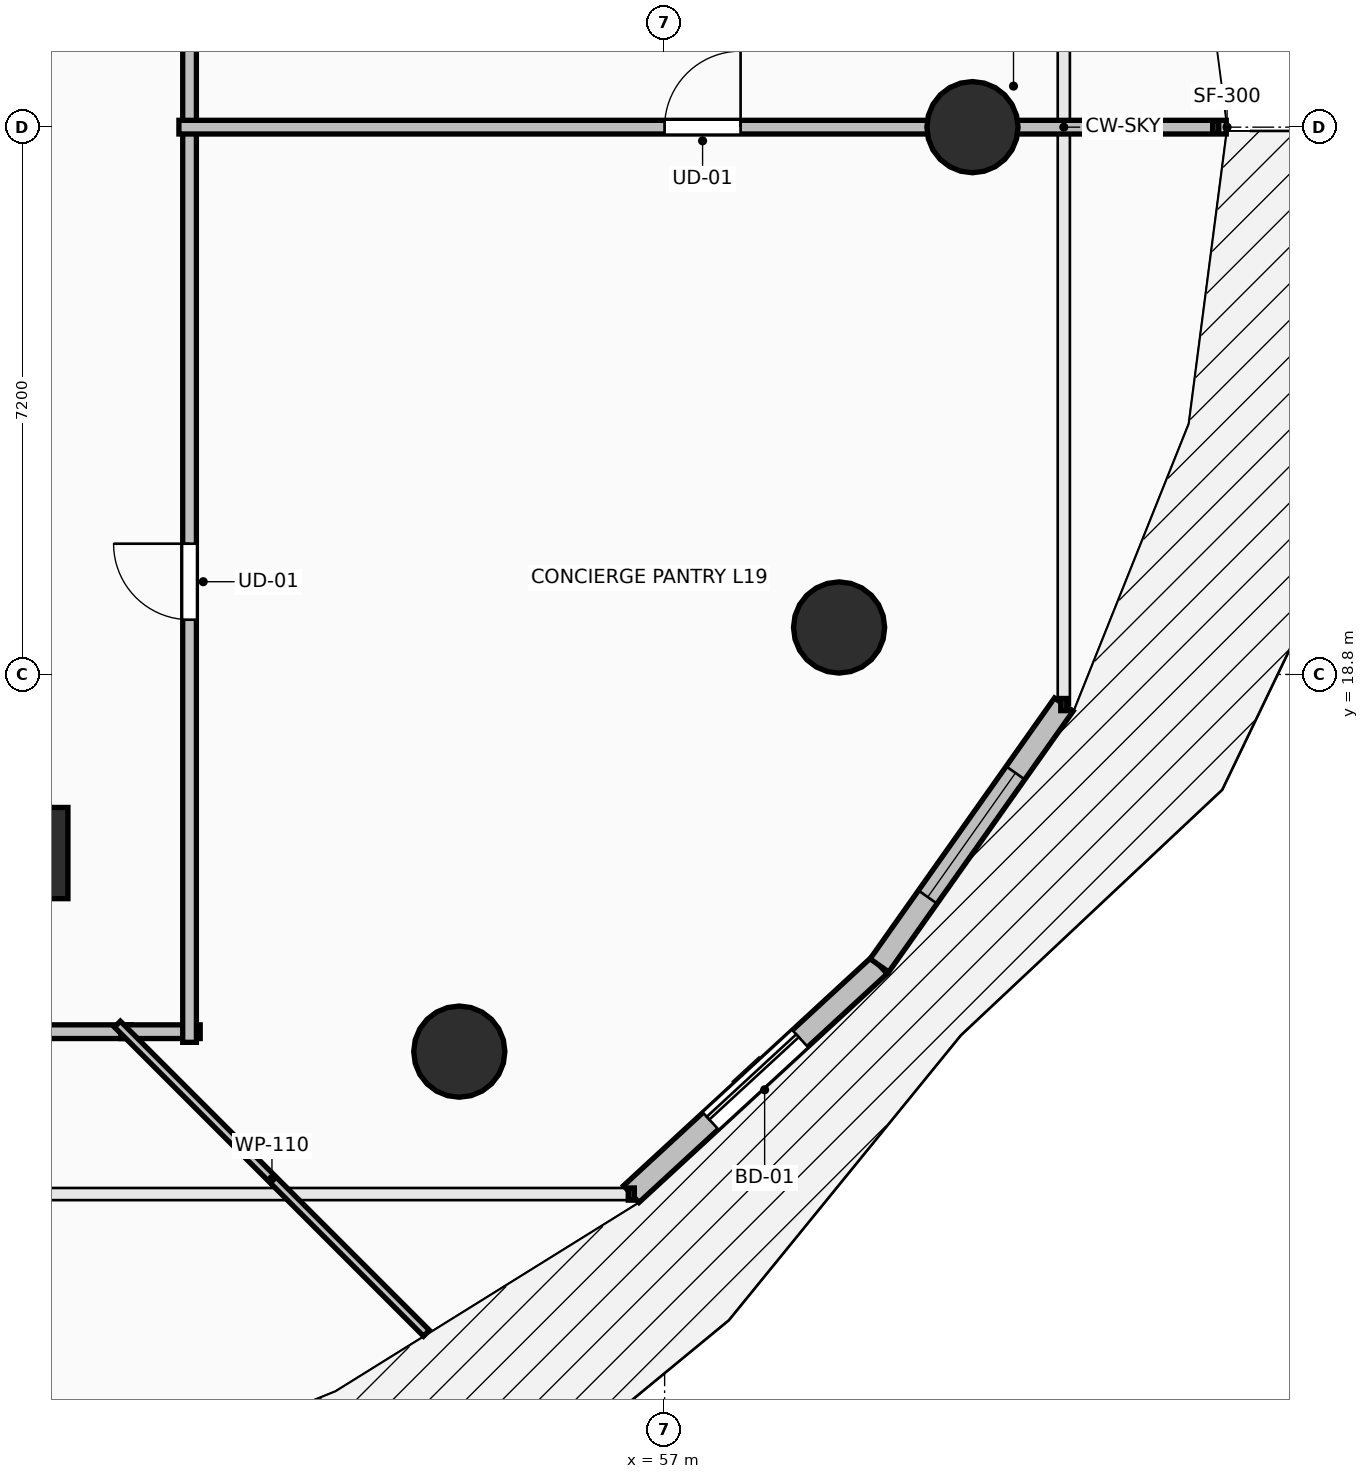
"""IFC4 building model, lengths in metres.
Left out: names, types, materials, properties, quantities, classifications, styles, units other than length and angle.
Written with IfcOpenShell. Run it as: python <this file> out.ifc"""

import sys

from ifc_helpers import new_model, si_unit, direction, frame, frame_2d, origin, origin_2d, place, context, subcontext, project, spatial, rectangle, circle, extrude, element, fill, save


model = new_model("IFC4")
c1 = context("Model", 3, precision=1e-05, world=origin(), true_north=direction((0.0, 1.0)))
c2 = subcontext(c1, "Body", "Model", "MODEL_VIEW")
j1 = project(units=[si_unit("LENGTHUNIT", "METRE"), si_unit("PLANEANGLEUNIT", "RADIAN")], contexts=[c1])
p1 = place(None, origin())
s1 = spatial("IfcSite", under=j1, at=p1, CompositionType="ELEMENT")
p2 = place(p1, origin())
s2 = spatial("IfcBuilding", under=s1, at=p2, CompositionType="ELEMENT")
p3 = place(p2, frame((0.0, 0.0, 74.3)))
s3 = spatial("IfcBuildingStorey", under=s2, at=p3, CompositionType="ELEMENT", Elevation=74.3)
for number, where, z_axis, x_axis in (
    (1, (61.05, 26.0, 0.0), (0.0, 0.0, 1.0), (1.0, 0.0, 0.0)),
    (2, (54.299, 13.838, 0.0), (0.0, 0.0, 1.0), (0.707, -0.707, 0.0)),
    (3, (59.295, 19.418, 0.0), (0.0, 0.0, 1.0), (0.924, -0.383, 0.0)),
):
    element("IfcColumn", number, at=place(p3, frame(where, z_axis=z_axis, x_axis=x_axis)), inside=s3, PredefinedType="COLUMN", context=c2, shape_type="SweptSolid", body=[
        extrude(circle(Radius=0.6, at=origin_2d()), origin(), (0.0, 0.0, 1.0), 4.5),
    ])
p4 = place(p3, frame((48.75, 16.45, 0.0), z_axis=(0.0, 0.0, 1.0), x_axis=(1.0, 0.0, 0.0)))
e4 = element("IfcColumn", 4, at=p4, inside=s3, PredefinedType="PILASTER", context=c2, shape_type="SweptSolid", body=[
    extrude(rectangle(XDim=0.8, YDim=1.2, at=origin_2d()), origin(), (0.0, 0.0, 1.0), 4.5),
])
p5 = place(p3, frame((56.562, 11.964, 0.0), z_axis=(0.0, 0.0, 1.0), x_axis=(0.735416718093, 0.677615119924, 0.0)))
e5 = element("IfcWall", 5, at=p5, inside=s3, PredefinedType="STANDARD", context=c2, shape_type="SweptSolid", body=[
    extrude(rectangle(XDim=4.439, YDim=0.3, at=frame_2d((2.22, 0.0))), origin(), (0.0, 0.0, 1.0), 4.24),
])
p6 = place(p5, frame((1.419, 0.0, 0.0)))
e6 = element("IfcOpeningElement", 6, at=p6, cuts=e5, PredefinedType="OPENING", context=c2, shape_type="SweptSolid", body=[
    extrude(rectangle(XDim=1.6, YDim=2.3, at=frame_2d((0.8, 1.15))), frame((0.0, 0.165, 0.0), z_axis=(0.0, -1.0, 0.0), x_axis=(1.0, 0.0, 0.0)), (0.0, 0.0, 1.0), 0.33),
])
p7 = place(p3, frame((59.826, 14.972, 0.0), z_axis=(0.0, 0.0, 1.0), x_axis=(0.57716435238, 0.81662801222, 0.0)))
e7 = element("IfcWall", 7, at=p7, inside=s3, PredefinedType="STANDARD", context=c2, shape_type="SweptSolid", body=[
    extrude(rectangle(XDim=4.202, YDim=0.3, at=frame_2d((2.101, 0.0))), origin(), (0.0, 0.0, 1.0), 4.24),
])
p8 = place(p7, frame((1.101, 0.0, 0.85)))
e8 = element("IfcOpeningElement", 8, at=p8, cuts=e7, PredefinedType="OPENING", context=c2, shape_type="SweptSolid", body=[
    extrude(rectangle(XDim=2.0, YDim=2.45, at=frame_2d((1.0, 1.225))), frame((0.0, 0.165, 0.0), z_axis=(0.0, -1.0, 0.0), x_axis=(1.0, 0.0, 0.0)), (0.0, 0.0, 1.0), 0.33),
])
p9 = place(p3, frame((50.75, 25.94, 0.0), z_axis=(0.0, 0.0, 1.0), x_axis=(0.0, 1.0, 0.0)))
e9 = element("IfcWall", 9, at=p9, inside=s3, PredefinedType="PARTITIONING", context=c2, shape_type="SweptSolid", body=[
    extrude(rectangle(XDim=10.01, YDim=0.18, at=frame_2d((5.005, 0.0))), origin(), (0.0, 0.0, 1.0), 3.432),
])
p10 = place(p9, frame((4.405, 0.0, 0.0)))
e10 = element("IfcOpeningElement", 10, at=p10, cuts=e9, PredefinedType="OPENING", context=c2, shape_type="SweptSolid", body=[
    extrude(rectangle(XDim=1.2, YDim=2.15, at=frame_2d((0.6, 1.075))), frame((0.0, 0.105, 0.0), z_axis=(0.0, -1.0, 0.0), x_axis=(1.0, 0.0, 0.0)), (0.0, 0.0, 1.0), 0.21),
])
p11 = place(p3, frame((42.34, 14.1, 0.0), z_axis=(0.0, 0.0, 1.0), x_axis=(1.0, 0.0, 0.0)))
e11 = element("IfcWall", 11, at=p11, inside=s3, PredefinedType="PARTITIONING", context=c2, shape_type="SweptSolid", body=[
    extrude(rectangle(XDim=7.645, YDim=0.18, at=frame_2d((3.823, 0.0))), origin(), (0.0, 0.0, 1.0), 3.432),
])
p12 = place(p11, frame((3.323, 0.0, 0.0)))
e12 = element("IfcOpeningElement", 12, at=p12, cuts=e11, PredefinedType="OPENING", context=c2, shape_type="SweptSolid", body=[
    extrude(rectangle(XDim=1.0, YDim=2.15, at=frame_2d((0.5, 1.075))), frame((0.0, 0.105, 0.0), z_axis=(0.0, -1.0, 0.0), x_axis=(1.0, 0.0, 0.0)), (0.0, 0.0, 1.0), 0.21),
])
p13 = place(p3, frame((49.845, 14.1, 0.0), z_axis=(0.0, 0.0, 1.0), x_axis=(1.0, 0.0, 0.0)))
e13 = element("IfcWall", 13, at=p13, inside=s3, PredefinedType="PARTITIONING", context=c2, shape_type="SweptSolid", body=[
    extrude(rectangle(XDim=1.045, YDim=0.18, at=frame_2d((0.522, 0.0))), origin(), (0.0, 0.0, 1.0), 3.874),
])
p14 = place(p3, frame((50.75, 13.96, 0.0), z_axis=(0.0, 0.0, 1.0), x_axis=(0.0, 1.0, 0.0)))
e14 = element("IfcWall", 14, at=p14, inside=s3, PredefinedType="PARTITIONING", context=c2, shape_type="SweptSolid", body=[
    extrude(rectangle(XDim=12.12, YDim=0.18, at=frame_2d((6.06, 0.0))), origin(), (0.0, 0.0, 1.0), 3.432),
])
p15 = place(p14, frame((5.56, 0.0, 0.0)))
e15 = element("IfcOpeningElement", 15, at=p15, cuts=e14, PredefinedType="OPENING", context=c2, shape_type="SweptSolid", body=[
    extrude(rectangle(XDim=1.0, YDim=2.15, at=frame_2d((0.5, 1.075))), frame((0.0, 0.105, 0.0), z_axis=(0.0, -1.0, 0.0), x_axis=(1.0, 0.0, 0.0)), (0.0, 0.0, 1.0), 0.21),
])
p16 = place(p3, frame((50.61, 26.0, 0.0), z_axis=(0.0, 0.0, 1.0), x_axis=(1.0, 0.0, 0.0)))
e16 = element("IfcWall", 16, at=p16, inside=s3, PredefinedType="PARTITIONING", context=c2, shape_type="SweptSolid", body=[
    extrude(rectangle(XDim=13.779, YDim=0.18, at=frame_2d((6.889, 0.0))), origin(), (0.0, 0.0, 1.0), 3.432),
])
p17 = place(p16, frame((6.389, 0.0, 0.0)))
e17 = element("IfcOpeningElement", 17, at=p17, cuts=e16, PredefinedType="OPENING", context=c2, shape_type="SweptSolid", body=[
    extrude(rectangle(XDim=1.0, YDim=2.15, at=frame_2d((0.5, 1.075))), frame((0.0, 0.105, 0.0), z_axis=(0.0, -1.0, 0.0), x_axis=(1.0, 0.0, 0.0)), (0.0, 0.0, 1.0), 0.21),
])
p18 = place(p3, frame((53.867, 10.133, 0.0), z_axis=(0.0, 0.0, 1.0), x_axis=(-0.707106781187, 0.707106781187, 0.0)))
e18 = element("IfcWall", 18, at=p18, inside=s3, PredefinedType="PARTITIONING", context=c2, shape_type="SweptSolid", body=[
    extrude(rectangle(XDim=5.75, YDim=0.11, at=frame_2d((2.875, 0.0))), origin(), (0.0, 0.0, 1.0), 3.624),
])
p19 = place(p6, origin())
e19 = element("IfcDoor", 19, at=p19, inside=s3, OperationType="SLIDING_TO_LEFT", PredefinedType="DOOR", context=c2, shape_type="SweptSolid", body=[
    extrude(rectangle(XDim=1.6, YDim=2.3, at=frame_2d((0.8, 1.15))), frame((0.0, 0.025, 0.0), z_axis=(0.0, -1.0, 0.0), x_axis=(1.0, 0.0, 0.0)), (0.0, 0.0, 1.0), 0.05),
])
fill(e6, e19)
p20 = place(p8, origin())
e20 = element("IfcWindow", 20, at=p20, inside=s3, PartitioningType="SINGLE_PANEL", PredefinedType="WINDOW", context=c2, shape_type="SweptSolid", body=[
    extrude(rectangle(XDim=2.0, YDim=2.45, at=frame_2d((1.0, 1.225))), frame((0.0, 0.03, 0.0), z_axis=(0.0, -1.0, 0.0), x_axis=(1.0, 0.0, 0.0)), (0.0, 0.0, 1.0), 0.06),
])
fill(e8, e20)
p21 = place(p15, origin())
e21 = element("IfcDoor", 21, at=p21, inside=s3, OperationType="SINGLE_SWING_RIGHT", PredefinedType="DOOR", context=c2, shape_type="SweptSolid", body=[
    extrude(rectangle(XDim=1.0, YDim=2.15, at=frame_2d((0.5, 1.075))), frame((0.0, 0.025, 0.0), z_axis=(0.0, -1.0, 0.0), x_axis=(1.0, 0.0, 0.0)), (0.0, 0.0, 1.0), 0.05),
])
fill(e15, e21)
p22 = place(p17, origin())
e22 = element("IfcDoor", 22, at=p22, inside=s3, OperationType="SINGLE_SWING_RIGHT", PredefinedType="DOOR", context=c2, shape_type="SweptSolid", body=[
    extrude(rectangle(XDim=1.0, YDim=2.15, at=frame_2d((0.5, 1.075))), frame((0.0, 0.025, 0.0), z_axis=(0.0, -1.0, 0.0), x_axis=(1.0, 0.0, 0.0)), (0.0, 0.0, 1.0), 0.05),
])
fill(e17, e22)
save(model, sys.argv[1])
